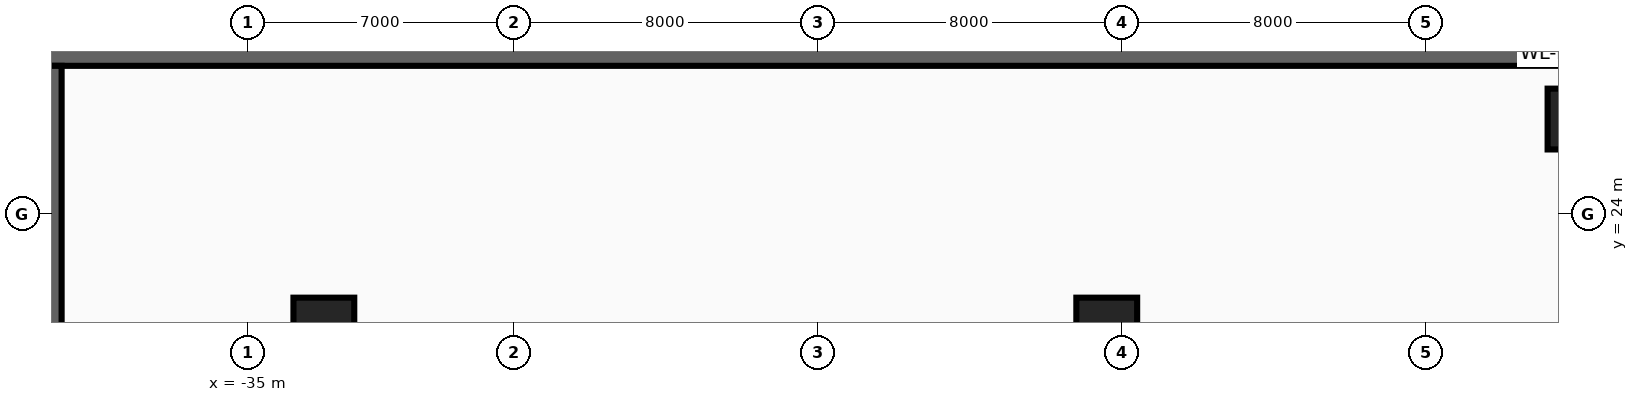
"""IFC4 building model, lengths in metres.
Left out: names, types, materials, properties, quantities, classifications, styles, units other than length and angle.
Written with IfcOpenShell. Run it as: python <this file> out.ifc"""

import sys

from ifc_helpers import new_model, si_unit, direction, frame, frame_2d, origin, origin_2d, place, context, subcontext, project, spatial, rectangle, extrude, source, transform, mapped, element, save


model = new_model("IFC4")
c1 = context("Model", 3, precision=1e-05, world=origin(), true_north=direction((0.0, 1.0)))
c2 = subcontext(c1, "Body", "Model", "MODEL_VIEW")
j1 = project(units=[si_unit("LENGTHUNIT", "METRE"), si_unit("PLANEANGLEUNIT", "RADIAN")], contexts=[c1])
p1 = place(None, origin())
s1 = spatial("IfcSite", under=j1, at=p1, CompositionType="ELEMENT")
p2 = place(p1, origin())
s2 = spatial("IfcBuilding", under=s1, at=p2, CompositionType="ELEMENT")
p3 = place(p2, frame((0.0, 0.0, -9.6)))
s3 = spatial("IfcBuildingStorey", under=s2, at=p3, CompositionType="ELEMENT", Elevation=-9.6)
p4 = place(p3, frame((-40.5, 28.2, 0.0), z_axis=(0.0, 0.0, 1.0), x_axis=(1.0, 0.0, 0.0)))
e1 = element("IfcWall", 1, at=p4, inside=s3, PredefinedType="SOLIDWALL", context=c2, shape_type="SweptSolid", body=[
    extrude(rectangle(XDim=81.0, YDim=0.6, at=frame_2d((40.5, 0.0))), origin(), (0.0, 0.0, 1.0), 4.54),
])
p5 = place(p3, frame((-40.2, -27.9, 0.0), z_axis=(0.0, 0.0, 1.0), x_axis=(0.0, 1.0, 0.0)))
e2 = element("IfcWall", 2, at=p5, inside=s3, PredefinedType="SOLIDWALL", context=c2, shape_type="SweptSolid", body=[
    extrude(rectangle(XDim=55.8, YDim=0.6, at=frame_2d((27.9, 0.0))), origin(), (0.0, 0.0, 1.0), 4.54),
])
m1 = source(origin(), c2, "Body", "SweptSolid", [
    extrude(rectangle(XDim=1.6, YDim=1.6, at=origin_2d()), origin(), (0.0, 0.0, 1.0), 4.8),
])
for number, where, z_axis, x_axis in (
    (3, (-33.0, 21.0, 0.0), (0.0, 0.0, 1.0), (1.0, 0.0, 0.0)),
    (4, (-12.4, 21.0, 0.0), (0.0, 0.0, 1.0), (1.0, 0.0, 0.0)),
    (5, (0.0, 26.5, 0.0), (0.0, 0.0, 1.0), (1.0, 0.0, 0.0)),
):
    element("IfcColumn", number, at=place(p3, frame(where, z_axis=z_axis, x_axis=x_axis)), inside=s3, PredefinedType="COLUMN", context=c2, shape_type="MappedRepresentation", body=[
        mapped(m1, transform((0.0, 0.0, 0.0), x_axis=(1.0, 0.0, 0.0), y_axis=(0.0, 1.0, 0.0), z_axis=(0.0, 0.0, 1.0), scale=1.0)),
    ])
save(model, sys.argv[1])
